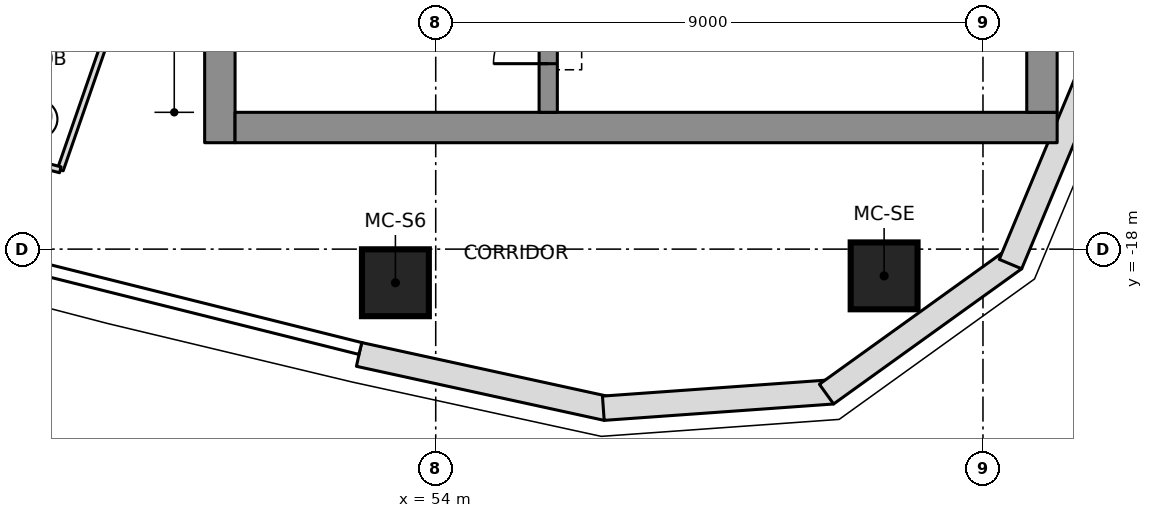
"""IFC4 building model, lengths in metres.
Left out: names, types, materials, properties, quantities, classifications, styles, units other than length and angle.
Written with IfcOpenShell. Run it as: python <this file> out.ifc"""

import sys

from ifc_helpers import new_model, si_unit, direction, frame, frame_2d, origin, origin_2d, place, context, subcontext, project, spatial, polyline, rectangle, outline, extrude, element, fill, save


model = new_model("IFC4")
c1 = context("Model", 3, precision=1e-05, world=origin(), true_north=direction((0.0, 1.0)))
c2 = subcontext(c1, "Body", "Model", "MODEL_VIEW")
j1 = project(units=[si_unit("LENGTHUNIT", "METRE"), si_unit("PLANEANGLEUNIT", "RADIAN")], contexts=[c1])
p1 = place(None, origin())
s1 = spatial("IfcSite", under=j1, at=p1, CompositionType="ELEMENT")
p2 = place(p1, origin())
s2 = spatial("IfcBuilding", under=s1, at=p2, CompositionType="ELEMENT")
p3 = place(p2, frame((0.0, 0.0, 285.65)))
s3 = spatial("IfcBuildingStorey", under=s2, at=p3, CompositionType="ELEMENT", Elevation=285.65)
p4 = place(p3, frame((50.45, -16.25, 0.0), z_axis=(0.0, 0.0, 1.0), x_axis=(0.0, 1.0, 0.0)))
e1 = element("IfcWall", 1, at=p4, inside=s3, PredefinedType="SHEAR", context=c2, shape_type="SweptSolid", body=[
    extrude(rectangle(XDim=9.6, YDim=0.5, at=frame_2d((4.8, 0.0))), origin(), (0.0, 0.0, 1.0), 3.55),
])
p5 = place(p4, frame((2.0, 0.0, 0.0)))
e2 = element("IfcOpeningElement", 2, at=p5, cuts=e1, PredefinedType="OPENING", context=c2, shape_type="SweptSolid", body=[
    extrude(rectangle(XDim=1.1, YDim=2.1, at=frame_2d((0.55, 1.05))), frame((0.0, 0.26, 0.0), z_axis=(0.0, -1.0, 0.0), x_axis=(1.0, 0.0, 0.0)), (0.0, 0.0, 1.0), 0.52),
])
p6 = place(p3, frame((50.7, -16.0, 0.0), z_axis=(0.0, 0.0, 1.0), x_axis=(1.0, 0.0, 0.0)))
e3 = element("IfcWall", 3, at=p6, inside=s3, PredefinedType="SHEAR", context=c2, shape_type="SweptSolid", body=[
    extrude(rectangle(XDim=13.52, YDim=0.5, at=frame_2d((6.76, 0.0))), origin(), (0.0, 0.0, 1.0), 3.55),
])
p7 = place(p3, frame((63.97, -15.75, 0.0), z_axis=(0.0, 0.0, 1.0), x_axis=(0.0, 1.0, 0.0)))
e4 = element("IfcWall", 4, at=p7, inside=s3, PredefinedType="SHEAR", context=c2, shape_type="SweptSolid", body=[
    extrude(rectangle(XDim=8.847, YDim=0.5, at=frame_2d((4.423, 0.0))), origin(), (0.0, 0.0, 1.0), 3.55),
])
p8 = place(p3, frame((55.85, -15.75, 0.0), z_axis=(0.0, 0.0, 1.0), x_axis=(0.0, 1.0, 0.0)))
e5 = element("IfcWall", 5, at=p8, inside=s3, PredefinedType="SHEAR", context=c2, shape_type="SweptSolid", body=[
    extrude(rectangle(XDim=5.4, YDim=0.3, at=frame_2d((2.7, 0.0))), origin(), (0.0, 0.0, 1.0), 3.55),
])
p9 = place(p8, frame((3.6, 0.0, 0.0)))
e6 = element("IfcOpeningElement", 6, at=p9, cuts=e5, PredefinedType="OPENING", context=c2, shape_type="SweptSolid", body=[
    extrude(rectangle(XDim=1.1, YDim=2.1, at=frame_2d((0.55, 1.05))), frame((0.0, 0.16, 0.0), z_axis=(0.0, -1.0, 0.0), x_axis=(1.0, 0.0, 0.0)), (0.0, 0.0, 1.0), 0.32),
])
p10 = place(p8, frame((0.8, 0.0, 0.0)))
e7 = element("IfcOpeningElement", 7, at=p10, cuts=e5, PredefinedType="OPENING", context=c2, shape_type="SweptSolid", body=[
    extrude(rectangle(XDim=0.9, YDim=2.1, at=frame_2d((0.45, 1.05))), frame((0.0, 0.16, 0.0), z_axis=(0.0, -1.0, 0.0), x_axis=(1.0, 0.0, 0.0)), (0.0, 0.0, 1.0), 0.32),
])
for number, where, z_axis, x_axis in (
    (8, (53.337, -18.553, 0.0), (0.0, 0.0, 1.0), (1.0, 0.0, 0.0)),
    (9, (61.374, -18.44, 0.0), (0.0, 0.0, 1.0), (1.0, 0.0, 0.0)),
):
    element("IfcColumn", number, at=place(p3, frame(where, z_axis=z_axis, x_axis=x_axis)), inside=s3, PredefinedType="COLUMN", context=c2, shape_type="SweptSolid", body=[
        extrude(rectangle(XDim=1.1, YDim=1.1, at=origin_2d()), origin(), (0.0, 0.0, 1.0), 3.55),
    ])
p11 = place(p3, frame((52.738, -19.732, 0.0), z_axis=(0.0, 0.0, 1.0), x_axis=(0.977020225348, -0.213146614471, 0.0)))
e10 = element("IfcWall", 10, at=p11, inside=s3, PredefinedType="NOTDEFINED", context=c2, shape_type="SweptSolid", body=[
    extrude(outline(polyline([(0.0, -0.2), (4.171, -0.2), (4.113, 0.2), (0.0, 0.2), (0.0, -0.2)])), origin(), (0.0, 0.0, 1.0), 3.25),
])
p12 = place(p3, frame((56.785, -20.615, 0.0), z_axis=(0.0, 0.0, 1.0), x_axis=(0.99746272096, 0.071190731806, 0.0)))
e11 = element("IfcWall", 11, at=p12, inside=s3, PredefinedType="NOTDEFINED", context=c2, shape_type="SweptSolid", body=[
    extrude(outline(polyline([(-0.029, -0.2), (3.753, -0.2), (3.64, 0.2), (0.029, 0.2), (-0.029, -0.2)])), origin(), (0.0, 0.0, 1.0), 3.25),
])
p13 = place(p3, frame((60.472, -20.352, 0.0), z_axis=(0.0, 0.0, 1.0), x_axis=(0.811962548682, 0.583709533533, 0.0)))
e12 = element("IfcWall", 12, at=p13, inside=s3, PredefinedType="NOTDEFINED", context=c2, shape_type="SweptSolid", body=[
    extrude(outline(polyline([(-0.057, -0.2), (3.753, -0.2), (3.64, 0.2), (0.057, 0.2), (-0.057, -0.2)])), origin(), (0.0, 0.0, 1.0), 3.25),
])
p14 = place(p3, frame((63.474, -18.194, 0.0), z_axis=(0.0, 0.0, 1.0), x_axis=(0.385285857918, 0.922797273343, 0.0)))
e13 = element("IfcWall", 13, at=p14, inside=s3, PredefinedType="NOTDEFINED", context=c2, shape_type="SweptSolid", body=[
    extrude(outline(polyline([(-0.057, -0.2), (3.726, -0.2), (3.667, 0.2), (0.057, 0.2), (-0.057, -0.2)])), origin(), (0.0, 0.0, 1.0), 3.25),
])
p15 = place(p3, frame((44.874, -17.579, 0.0), z_axis=(0.0, 0.0, 1.0), x_axis=(0.327705598625, 0.944779890043, 0.0)))
e14 = element("IfcWall", 14, at=p15, inside=s3, PredefinedType="PARTITIONING", context=c2, shape_type="SweptSolid", body=[
    extrude(rectangle(XDim=9.61, YDim=0.2, at=frame_2d((4.805, 0.0))), origin(), (0.0, 0.0, 1.0), 3.25),
])
p16 = place(p3, frame((48.583, -14.516, 0.0), z_axis=(0.0, 0.0, 1.0), x_axis=(-0.327695604762, -0.944783356447, 0.0)))
e15 = element("IfcWall", 15, at=p16, inside=s3, PredefinedType="PARTITIONING", context=c2, shape_type="SweptSolid", body=[
    extrude(rectangle(XDim=2.307, YDim=0.1, at=frame_2d((1.154, 0.0))), origin(), (0.0, 0.0, 1.0), 3.25),
])
p17 = place(p3, frame((47.826, -16.696, 0.0), z_axis=(0.0, 0.0, 1.0), x_axis=(-0.967650770907, 0.25229345129, 0.0)))
e16 = element("IfcWall", 16, at=p17, inside=s3, PredefinedType="PARTITIONING", context=c2, shape_type="SweptSolid", body=[
    extrude(rectangle(XDim=1.934, YDim=0.1, at=frame_2d((0.967, 0.0))), origin(), (0.0, 0.0, 1.0), 3.25),
])
p18 = place(p10, origin())
e17 = element("IfcDoor", 17, at=p18, inside=s3, OperationType="SINGLE_SWING_LEFT", PredefinedType="DOOR", context=c2, shape_type="SweptSolid", body=[
    extrude(rectangle(XDim=0.9, YDim=2.1, at=frame_2d((0.45, 1.05))), frame((0.0, 0.025, 0.0), z_axis=(0.0, -1.0, 0.0), x_axis=(1.0, 0.0, 0.0)), (0.0, 0.0, 1.0), 0.05),
])
fill(e7, e17)
save(model, sys.argv[1])
